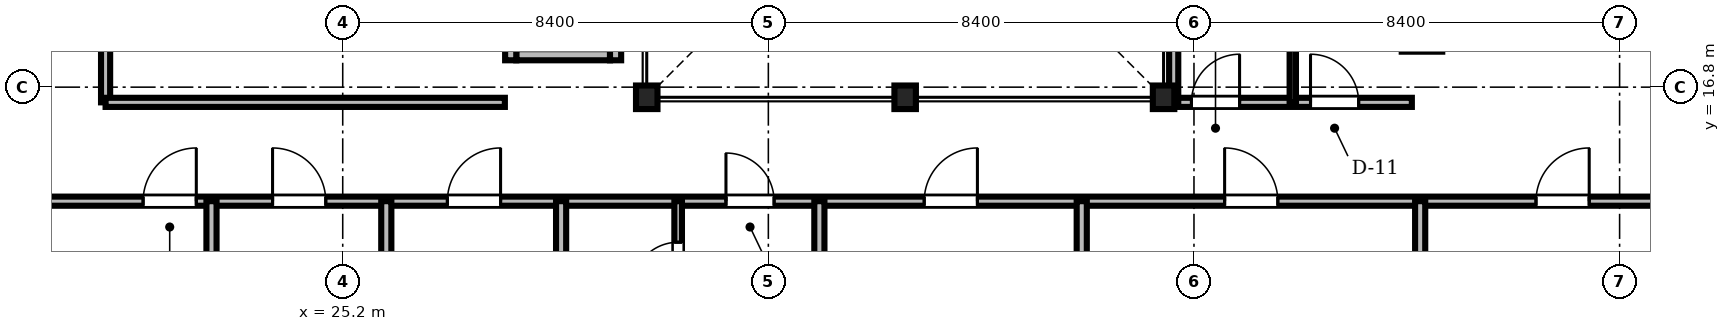
"""IFC4 building model, lengths in metres.
Left out: names, types, materials, properties, quantities, classifications, styles, units other than length and angle.
Written with IfcOpenShell. Run it as: python <this file> out.ifc"""

import sys

from ifc_helpers import new_model, si_unit, direction, frame, frame_2d, origin, origin_2d, place, context, subcontext, project, spatial, rectangle, i_section, extrude, source, transform, mapped, element, fill, save


model = new_model("IFC4")
c1 = context("Model", 3, precision=1e-05, world=origin(), true_north=direction((0.0, 1.0)))
c2 = subcontext(c1, "Body", "Model", "MODEL_VIEW")
j1 = project(units=[si_unit("LENGTHUNIT", "METRE"), si_unit("PLANEANGLEUNIT", "RADIAN")], contexts=[c1])
p1 = place(None, origin())
s1 = spatial("IfcSite", under=j1, at=p1, CompositionType="ELEMENT")
p2 = place(p1, origin())
s2 = spatial("IfcBuilding", under=s1, at=p2, CompositionType="ELEMENT")
p3 = place(p2, frame((0.0, 0.0, 103.7)))
s3 = spatial("IfcBuildingStorey", under=s2, at=p3, CompositionType="ELEMENT", Elevation=103.7)
m1 = source(origin(), c2, "Body", "SweptSolid", [
    extrude(i_section(OverallWidth=0.424, OverallDepth=0.465, WebThickness=0.035, FlangeThickness=0.056, FilletRadius=0.015, at=origin_2d()), origin(), (0.0, 0.0, 1.0), 3.56),
])
for number, where, z_axis, x_axis in (
    (1, (31.2, 16.6, 0.0), (0.0, 0.0, 1.0), (1.0, 0.0, 0.0)),
    (2, (36.3, 16.6, 0.0), (0.0, 0.0, 1.0), (1.0, 0.0, 0.0)),
    (3, (41.4, 16.6, 0.0), (0.0, 0.0, 1.0), (1.0, 0.0, 0.0)),
):
    element("IfcColumn", number, at=place(p3, frame(where, z_axis=z_axis, x_axis=x_axis)), inside=s3, PredefinedType="COLUMN", context=c2, shape_type="MappedRepresentation", body=[
        mapped(m1, transform((0.0, 0.0, 0.0), scale=1.0)),
    ])
m2 = source(origin(), c2, "Body", "SweptSolid", [
    extrude(rectangle(XDim=1.85, YDim=0.22, at=frame_2d((0.925, 0.0))), origin(), (0.0, 0.0, 1.0), 3.56),
])
p4 = place(p3, frame((28.625, 17.44, 0.0), z_axis=(0.0, 0.0, 1.0), x_axis=(1.0, 0.0, 0.0)))
e4 = element("IfcWall", 4, at=p4, inside=s3, PredefinedType="SOLIDWALL", context=c2, shape_type="MappedRepresentation", body=[
    mapped(m2, transform((0.0, 0.0, 0.0), scale=1.0)),
])
m3 = source(origin(), c2, "Body", "SweptSolid", [
    extrude(rectangle(XDim=2.54, YDim=0.22, at=frame_2d((1.27, 0.0))), origin(), (0.0, 0.0, 1.0), 3.56),
])
for number, where, z_axis, x_axis in (
    (5, (28.515, 17.33, 0.0), (0.0, 0.0, 1.0), (0.0, 1.0, 0.0)),
    (6, (30.585, 17.33, 0.0), (0.0, 0.0, 1.0), (0.0, 1.0, 0.0)),
):
    element("IfcWall", number, at=place(p3, frame(where, z_axis=z_axis, x_axis=x_axis)), inside=s3, PredefinedType="SOLIDWALL", context=c2, shape_type="MappedRepresentation", body=[
        mapped(m3, transform((0.0, 0.0, 0.0), scale=1.0)),
    ])
m4 = source(origin(), c2, "Body", "SweptSolid", [
    extrude(rectangle(XDim=46.156, YDim=0.18, at=frame_2d((23.078, 0.0))), origin(), (0.0, 0.0, 1.0), 2.802),
])
p5 = place(p3, frame((6.922, 14.55, 0.0), z_axis=(0.0, 0.0, 1.0), x_axis=(1.0, 0.0, 0.0)))
e7 = element("IfcWall", 7, at=p5, inside=s3, PredefinedType="PARTITIONING", context=c2, shape_type="MappedRepresentation", body=[
    mapped(m4, transform((0.0, 0.0, 0.0), scale=1.0)),
])
m5 = source(origin(), c2, "Body", "SweptSolid", [
    extrude(rectangle(XDim=1.05, YDim=2.2, at=frame_2d((0.525, 1.1))), frame((0.0, 0.1, 0.0), z_axis=(0.0, -1.0, 0.0), x_axis=(1.0, 0.0, 0.0)), (0.0, 0.0, 1.0), 0.2),
])
p6 = place(p5, frame((14.338, 0.0, 0.0)))
e8 = element("IfcOpeningElement", 8, at=p6, cuts=e7, PredefinedType="OPENING", context=c2, shape_type="MappedRepresentation", body=[
    mapped(m5, transform((0.0, 0.0, 0.0), scale=1.0)),
])
p7 = place(p5, frame((16.893, 0.0, 0.0)))
e9 = element("IfcOpeningElement", 9, at=p7, cuts=e7, PredefinedType="OPENING", context=c2, shape_type="MappedRepresentation", body=[
    mapped(m5, transform((0.0, 0.0, 0.0), scale=1.0)),
])
p8 = place(p5, frame((20.344, 0.0, 0.0)))
e10 = element("IfcOpeningElement", 10, at=p8, cuts=e7, PredefinedType="OPENING", context=c2, shape_type="MappedRepresentation", body=[
    mapped(m5, transform((0.0, 0.0, 0.0), scale=1.0)),
])
m6 = source(origin(), c2, "Body", "SweptSolid", [
    extrude(rectangle(XDim=0.95, YDim=2.15, at=frame_2d((0.475, 1.075))), frame((0.0, 0.1, 0.0), z_axis=(0.0, -1.0, 0.0), x_axis=(1.0, 0.0, 0.0)), (0.0, 0.0, 1.0), 0.2),
])
p9 = place(p5, frame((25.842, 0.0, 0.0)))
e11 = element("IfcOpeningElement", 11, at=p9, cuts=e7, PredefinedType="OPENING", context=c2, shape_type="MappedRepresentation", body=[
    mapped(m6, transform((0.0, 0.0, 0.0), scale=1.0)),
])
p10 = place(p5, frame((29.754, 0.0, 0.0)))
e12 = element("IfcOpeningElement", 12, at=p10, cuts=e7, PredefinedType="OPENING", context=c2, shape_type="MappedRepresentation", body=[
    mapped(m5, transform((0.0, 0.0, 0.0), scale=1.0)),
])
p11 = place(p5, frame((35.683, 0.0, 0.0)))
e13 = element("IfcOpeningElement", 13, at=p11, cuts=e7, PredefinedType="OPENING", context=c2, shape_type="MappedRepresentation", body=[
    mapped(m5, transform((0.0, 0.0, 0.0), scale=1.0)),
])
p12 = place(p5, frame((41.828, 0.0, 0.0)))
e14 = element("IfcOpeningElement", 14, at=p12, cuts=e7, PredefinedType="OPENING", context=c2, shape_type="MappedRepresentation", body=[
    mapped(m5, transform((0.0, 0.0, 0.0), scale=1.0)),
])
m7 = source(origin(), c2, "Body", "SweptSolid", [
    extrude(rectangle(XDim=4.7, YDim=0.18, at=frame_2d((2.35, 0.0))), origin(), (0.0, 0.0, 1.0), 2.952),
])
p13 = place(p3, frame((41.6, 16.5, 0.0), z_axis=(0.0, 0.0, 1.0), x_axis=(1.0, 0.0, 0.0)))
e15 = element("IfcWall", 15, at=p13, inside=s3, PredefinedType="PARTITIONING", context=c2, shape_type="MappedRepresentation", body=[
    mapped(m7, transform((0.0, 0.0, 0.0), scale=1.0)),
])
p14 = place(p13, frame((0.35, 0.0, 0.0)))
e16 = element("IfcOpeningElement", 16, at=p14, cuts=e15, PredefinedType="OPENING", context=c2, shape_type="MappedRepresentation", body=[
    mapped(m6, transform((0.0, 0.0, 0.0), scale=1.0)),
])
p15 = place(p13, frame((2.7, 0.0, 0.0)))
e17 = element("IfcOpeningElement", 17, at=p15, cuts=e15, PredefinedType="OPENING", context=c2, shape_type="MappedRepresentation", body=[
    mapped(m6, transform((0.0, 0.0, 0.0), scale=1.0)),
])
m8 = source(origin(), c2, "Body", "SweptSolid", [
    extrude(rectangle(XDim=3.55, YDim=0.18, at=frame_2d((1.775, 0.0))), origin(), (0.0, 0.0, 1.0), 2.952),
])
p16 = place(p3, frame((20.52, 16.5, 0.0), z_axis=(0.0, 0.0, 1.0), x_axis=(0.0, 1.0, 0.0)))
e18 = element("IfcWall", 18, at=p16, inside=s3, PredefinedType="PARTITIONING", context=c2, shape_type="MappedRepresentation", body=[
    mapped(m8, transform((0.0, 0.0, 0.0), scale=1.0)),
])
p17 = place(p16, frame((1.15, 0.0, 0.0)))
e19 = element("IfcOpeningElement", 19, at=p17, cuts=e18, PredefinedType="OPENING", context=c2, shape_type="MappedRepresentation", body=[
    mapped(m5, transform((0.0, 0.0, 0.0), scale=1.0)),
])
m9 = source(origin(), c2, "Body", "SweptSolid", [
    extrude(rectangle(XDim=2.36, YDim=0.15, at=frame_2d((1.18, 0.0))), origin(), (0.0, 0.0, 1.0), 3.56),
])
p18 = place(p3, frame((31.82, 12.19, 0.0), z_axis=(0.0, 0.0, 1.0), x_axis=(0.0, 1.0, 0.0)))
e20 = element("IfcWall", 20, at=p18, inside=s3, PredefinedType="PARTITIONING", context=c2, shape_type="MappedRepresentation", body=[
    mapped(m9, transform((0.0, 0.0, 0.0), scale=1.0)),
])
m10 = source(origin(), c2, "Body", "SweptSolid", [
    extrude(rectangle(XDim=0.9, YDim=2.1, at=frame_2d((0.45, 1.05))), frame((0.0, 0.085, 0.0), z_axis=(0.0, -1.0, 0.0), x_axis=(1.0, 0.0, 0.0)), (0.0, 0.0, 1.0), 0.17),
])
p19 = place(p18, frame((0.65, 0.0, 0.0)))
e21 = element("IfcOpeningElement", 21, at=p19, cuts=e20, PredefinedType="OPENING", context=c2, shape_type="MappedRepresentation", body=[
    mapped(m10, transform((0.0, 0.0, 0.0), scale=1.0)),
])
m11 = source(origin(), c2, "Body", "SweptSolid", [
    extrude(rectangle(XDim=12.428, YDim=0.2, at=frame_2d((6.214, 0.0))), origin(), (0.0, 0.0, 1.0), 2.802),
])
for number, where, z_axis, x_axis in (
    (22, (22.61, 2.122, 0.0), (0.0, 0.0, 1.0), (0.0, 1.0, 0.0)),
    (23, (26.06, 2.122, 0.0), (0.0, 0.0, 1.0), (0.0, 1.0, 0.0)),
):
    element("IfcWall", number, at=place(p3, frame(where, z_axis=z_axis, x_axis=x_axis)), inside=s3, PredefinedType="PARTITIONING", context=c2, shape_type="MappedRepresentation", body=[
        mapped(m11, transform((0.0, 0.0, 0.0), scale=1.0)),
    ])
m12 = source(origin(), c2, "Body", "SweptSolid", [
    extrude(rectangle(XDim=12.62, YDim=0.2, at=frame_2d((6.31, 0.0))), origin(), (0.0, 0.0, 1.0), 2.802),
])
p20 = place(p3, frame((29.51, 1.93, 0.0), z_axis=(0.0, 0.0, 1.0), x_axis=(0.0, 1.0, 0.0)))
e24 = element("IfcWall", 24, at=p20, inside=s3, PredefinedType="PARTITIONING", context=c2, shape_type="MappedRepresentation", body=[
    mapped(m12, transform((0.0, 0.0, 0.0), scale=1.0)),
])
for number, where, z_axis, x_axis in (
    (25, (34.607, 2.122, 0.0), (0.0, 0.0, 1.0), (0.0, 1.0, 0.0)),
    (26, (39.785, 2.122, 0.0), (0.0, 0.0, 1.0), (0.0, 1.0, 0.0)),
    (27, (46.464, 2.122, 0.0), (0.0, 0.0, 1.0), (0.0, 1.0, 0.0)),
):
    element("IfcWall", number, at=place(p3, frame(where, z_axis=z_axis, x_axis=x_axis)), inside=s3, PredefinedType="PARTITIONING", context=c2, shape_type="MappedRepresentation", body=[
        mapped(m11, transform((0.0, 0.0, 0.0), scale=1.0)),
    ])
m13 = source(origin(), c2, "Body", "SweptSolid", [
    extrude(rectangle(XDim=7.88, YDim=0.18, at=frame_2d((3.94, 0.0))), origin(), (0.0, 0.0, 1.0), 3.56),
])
p21 = place(p3, frame((20.52, 16.5, 0.0), z_axis=(0.0, 0.0, 1.0), x_axis=(1.0, 0.0, 0.0)))
e28 = element("IfcWall", 28, at=p21, inside=s3, PredefinedType="PARTITIONING", context=c2, shape_type="MappedRepresentation", body=[
    mapped(m13, transform((0.0, 0.0, 0.0), scale=1.0)),
])
m14 = source(origin(), c2, "Body", "SweptSolid", [
    extrude(rectangle(XDim=7.15, YDim=0.18, at=frame_2d((3.575, 0.0))), origin(), (0.0, 0.0, 1.0), 2.952),
])
p22 = place(p3, frame((41.6, 16.5, 0.0), z_axis=(0.0, 0.0, 1.0), x_axis=(0.0, 1.0, 0.0)))
e29 = element("IfcWall", 29, at=p22, inside=s3, PredefinedType="PARTITIONING", context=c2, shape_type="MappedRepresentation", body=[
    mapped(m14, transform((0.0, 0.0, 0.0), scale=1.0)),
])
m15 = source(origin(), c2, "Body", "SweptSolid", [
    extrude(rectangle(XDim=7.15, YDim=0.125, at=frame_2d((3.575, 0.0))), origin(), (0.0, 0.0, 1.0), 2.952),
])
p23 = place(p3, frame((43.95, 16.5, 0.0), z_axis=(0.0, 0.0, 1.0), x_axis=(0.0, 1.0, 0.0)))
e30 = element("IfcWall", 30, at=p23, inside=s3, PredefinedType="PARTITIONING", context=c2, shape_type="MappedRepresentation", body=[
    mapped(m15, transform((0.0, 0.0, 0.0), scale=1.0)),
])
m16 = source(origin(), c2, "Body", "SweptSolid", [
    extrude(rectangle(XDim=1.05, YDim=2.2, at=frame_2d((0.525, 1.1))), frame((0.0, 0.025, 0.0), z_axis=(0.0, -1.0, 0.0), x_axis=(1.0, 0.0, 0.0)), (0.0, 0.0, 1.0), 0.05),
])
p24 = place(p6, origin())
e31 = element("IfcDoor", 31, at=p24, inside=s3, OperationType="SINGLE_SWING_RIGHT", PredefinedType="DOOR", context=c2, shape_type="MappedRepresentation", body=[
    mapped(m16, transform((0.0, 0.0, 0.0), scale=1.0)),
])
fill(e8, e31)
p25 = place(p7, origin())
e32 = element("IfcDoor", 32, at=p25, inside=s3, OperationType="SINGLE_SWING_LEFT", PredefinedType="DOOR", context=c2, shape_type="MappedRepresentation", body=[
    mapped(m16, transform((0.0, 0.0, 0.0), scale=1.0)),
])
fill(e9, e32)
p26 = place(p8, origin())
e33 = element("IfcDoor", 33, at=p26, inside=s3, OperationType="SINGLE_SWING_RIGHT", PredefinedType="DOOR", context=c2, shape_type="MappedRepresentation", body=[
    mapped(m16, transform((0.0, 0.0, 0.0), scale=1.0)),
])
fill(e10, e33)
m17 = source(origin(), c2, "Body", "SweptSolid", [
    extrude(rectangle(XDim=0.95, YDim=2.15, at=frame_2d((0.475, 1.075))), frame((0.0, 0.025, 0.0), z_axis=(0.0, -1.0, 0.0), x_axis=(1.0, 0.0, 0.0)), (0.0, 0.0, 1.0), 0.05),
])
p27 = place(p9, origin())
e34 = element("IfcDoor", 34, at=p27, inside=s3, OperationType="SINGLE_SWING_LEFT", PredefinedType="DOOR", context=c2, shape_type="MappedRepresentation", body=[
    mapped(m17, transform((0.0, 0.0, 0.0), scale=1.0)),
])
fill(e11, e34)
p28 = place(p10, origin())
e35 = element("IfcDoor", 35, at=p28, inside=s3, OperationType="SINGLE_SWING_RIGHT", PredefinedType="DOOR", context=c2, shape_type="MappedRepresentation", body=[
    mapped(m16, transform((0.0, 0.0, 0.0), scale=1.0)),
])
fill(e12, e35)
p29 = place(p11, origin())
e36 = element("IfcDoor", 36, at=p29, inside=s3, OperationType="SINGLE_SWING_LEFT", PredefinedType="DOOR", context=c2, shape_type="MappedRepresentation", body=[
    mapped(m16, transform((0.0, 0.0, 0.0), scale=1.0)),
])
fill(e13, e36)
p30 = place(p12, origin())
e37 = element("IfcDoor", 37, at=p30, inside=s3, OperationType="SINGLE_SWING_RIGHT", PredefinedType="DOOR", context=c2, shape_type="MappedRepresentation", body=[
    mapped(m16, transform((0.0, 0.0, 0.0), scale=1.0)),
])
fill(e14, e37)
p31 = place(p14, origin())
e38 = element("IfcDoor", 38, at=p31, inside=s3, OperationType="SINGLE_SWING_RIGHT", PredefinedType="DOOR", context=c2, shape_type="MappedRepresentation", body=[
    mapped(m17, transform((0.0, 0.0, 0.0), scale=1.0)),
])
fill(e16, e38)
p32 = place(p15, origin())
e39 = element("IfcDoor", 39, at=p32, inside=s3, OperationType="SINGLE_SWING_LEFT", PredefinedType="DOOR", context=c2, shape_type="MappedRepresentation", body=[
    mapped(m17, transform((0.0, 0.0, 0.0), scale=1.0)),
])
fill(e17, e39)
m18 = source(origin(), c2, "Body", "SweptSolid", [
    extrude(rectangle(XDim=0.9, YDim=2.1, at=frame_2d((0.45, 1.05))), frame((0.0, 0.025, 0.0), z_axis=(0.0, -1.0, 0.0), x_axis=(1.0, 0.0, 0.0)), (0.0, 0.0, 1.0), 0.05),
])
p33 = place(p19, origin())
e40 = element("IfcDoor", 40, at=p33, inside=s3, OperationType="SINGLE_SWING_LEFT", PredefinedType="DOOR", context=c2, shape_type="MappedRepresentation", body=[
    mapped(m18, transform((0.0, 0.0, 0.0), scale=1.0)),
])
fill(e21, e40)
save(model, sys.argv[1])
